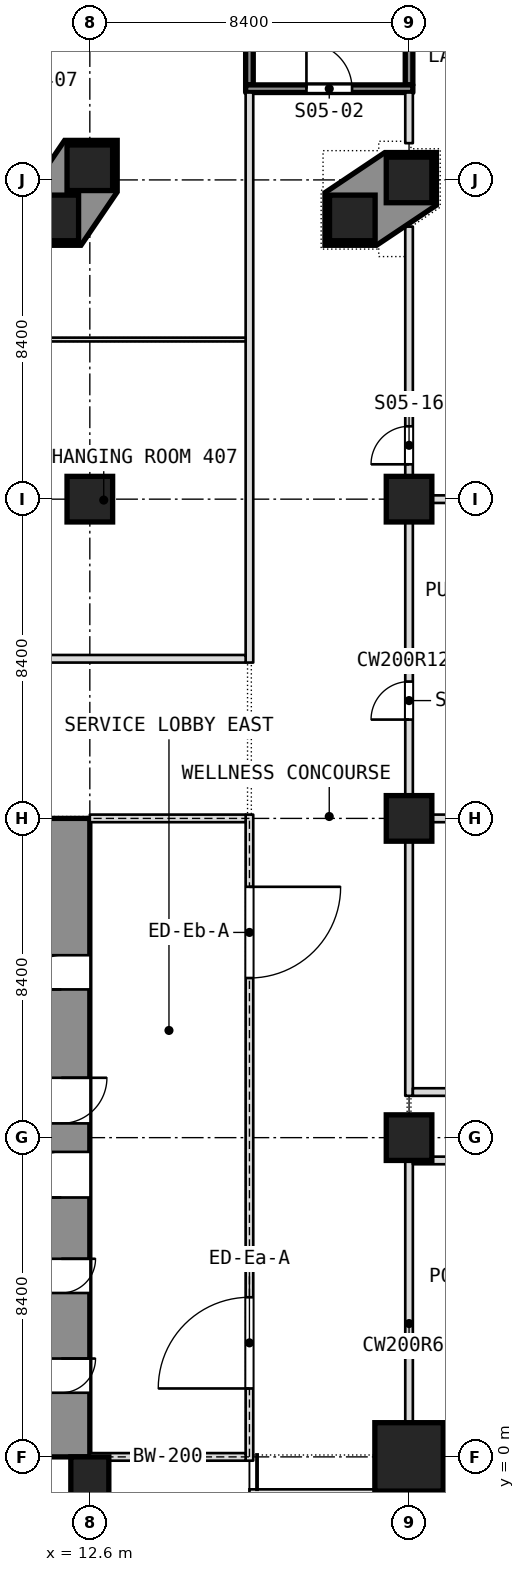
"""IFC4 building model, lengths in metres.
Left out: names, types, materials, properties, quantities, classifications, styles, units other than length and angle.
Written with IfcOpenShell. Run it as: python <this file> out.ifc"""

import sys

from ifc_helpers import new_model, si_unit, direction, frame, frame_2d, origin, origin_2d, place, context, subcontext, project, spatial, polyline, rectangle, outline, extrude, element, fill, save


model = new_model("IFC4")
c1 = context("Model", 3, precision=1e-05, world=origin(), true_north=direction((0.0, 1.0)))
c2 = subcontext(c1, "Body", "Model", "MODEL_VIEW")
j1 = project(units=[si_unit("LENGTHUNIT", "METRE"), si_unit("PLANEANGLEUNIT", "RADIAN")], contexts=[c1])
p1 = place(None, origin())
s1 = spatial("IfcSite", under=j1, at=p1, CompositionType="ELEMENT")
p2 = place(p1, origin())
s2 = spatial("IfcBuilding", under=s1, at=p2, CompositionType="ELEMENT")
p3 = place(p2, frame((0.0, 0.0, 26.0)))
s3 = spatial("IfcBuildingStorey", under=s2, at=p3, CompositionType="ELEMENT", Elevation=26.0)
p4 = place(p3, frame((21.0, 0.0, 0.0), z_axis=(0.0, 0.0, 1.0), x_axis=(1.0, 0.0, 0.0)))
e1 = element("IfcColumn", 1, at=p4, inside=s3, PredefinedType="COLUMN", context=c2, shape_type="SweptSolid", body=[
    extrude(rectangle(XDim=1.8, YDim=1.8, at=origin_2d()), origin(), (0.0, 0.0, 1.0), 5.0),
])
for number, where, z_axis, x_axis in (
    (2, (21.0, 8.4, 0.0), (0.0, 0.0, 1.0), (1.0, 0.0, 0.0)),
    (3, (21.0, 16.8, 0.0), (0.0, 0.0, 1.0), (1.0, 0.0, 0.0)),
    (4, (12.6, 25.2, 0.0), (0.0, 0.0, 1.0), (1.0, 0.0, 0.0)),
    (5, (21.0, 25.2, 0.0), (0.0, 0.0, 1.0), (1.0, 0.0, 0.0)),
    (6, (12.6, 33.92, 0.0), (0.0, 0.0, 1.0), (1.0, 0.0, 0.0)),
    (7, (21.0, 33.6, 0.0), (0.0, 0.0, 1.0), (1.0, 0.0, 0.0)),
):
    element("IfcColumn", number, at=place(p3, frame(where, z_axis=z_axis, x_axis=x_axis)), inside=s3, PredefinedType="COLUMN", context=c2, shape_type="SweptSolid", body=[
        extrude(rectangle(XDim=1.2, YDim=1.2, at=origin_2d()), origin(), (0.0, 0.0, 1.0), 5.0),
    ])
p5 = place(p3, frame((11.85, 0.0, 0.0), z_axis=(0.0, 0.0, 1.0), x_axis=(0.0, 1.0, 0.0)))
e8 = element("IfcWall", 8, at=p5, inside=s3, PredefinedType="SHEAR", context=c2, shape_type="SweptSolid", body=[
    extrude(rectangle(XDim=16.8, YDim=1.5, at=frame_2d((8.4, 0.0))), origin(), (0.0, 0.0, 1.0), 5.0),
])
p6 = place(p5, frame((1.688, 0.0, 0.0)))
e9 = element("IfcOpeningElement", 9, at=p6, cuts=e8, PredefinedType="OPENING", context=c2, shape_type="SweptSolid", body=[
    extrude(rectangle(XDim=0.9, YDim=2.1, at=frame_2d((0.45, 1.05))), frame((0.0, 0.75, 0.0), z_axis=(0.0, -1.0, 0.0), x_axis=(1.0, 0.0, 0.0)), (0.0, 0.0, 1.0), 1.5),
])
p7 = place(p5, frame((4.312, 0.0, 0.0)))
e10 = element("IfcOpeningElement", 10, at=p7, cuts=e8, PredefinedType="OPENING", context=c2, shape_type="SweptSolid", body=[
    extrude(rectangle(XDim=0.9, YDim=2.1, at=frame_2d((0.45, 1.05))), frame((0.0, 0.75, 0.0), z_axis=(0.0, -1.0, 0.0), x_axis=(1.0, 0.0, 0.0)), (0.0, 0.0, 1.0), 1.5),
])
p8 = place(p5, frame((6.825, 0.0, 0.0)))
e11 = element("IfcOpeningElement", 11, at=p8, cuts=e8, PredefinedType="OPENING", context=c2, shape_type="SweptSolid", body=[
    extrude(rectangle(XDim=1.2, YDim=2.1, at=frame_2d((0.6, 1.05))), frame((0.0, 0.75, 0.0), z_axis=(0.0, -1.0, 0.0), x_axis=(1.0, 0.0, 0.0)), (0.0, 0.0, 1.0), 1.5),
])
p9 = place(p5, frame((12.3, 0.0, 0.0)))
e12 = element("IfcOpeningElement", 12, at=p9, cuts=e8, PredefinedType="OPENING", context=c2, shape_type="SweptSolid", body=[
    extrude(rectangle(XDim=0.9, YDim=2.1, at=frame_2d((0.45, 1.05))), frame((0.0, 0.75, 0.0), z_axis=(0.0, -1.0, 0.0), x_axis=(1.0, 0.0, 0.0)), (0.0, 0.0, 1.0), 1.5),
])
p10 = place(p5, frame((8.775, 0.0, 0.0)))
e13 = element("IfcOpeningElement", 13, at=p10, cuts=e8, PredefinedType="OPENING", context=c2, shape_type="SweptSolid", body=[
    extrude(rectangle(XDim=1.2, YDim=2.1, at=frame_2d((0.6, 1.05))), frame((0.0, 0.75, 0.0), z_axis=(0.0, -1.0, 0.0), x_axis=(1.0, 0.0, 0.0)), (0.0, 0.0, 1.0), 1.5),
])
for number, where, z_axis, x_axis in (
    (14, (11.704, 32.6, 0.0), (0.0, 0.0, 1.0), (1.0, 0.0, 0.0)),
    (15, (19.507, 32.6, 0.0), (0.0, 0.0, 1.0), (1.0, 0.0, 0.0)),
):
    element("IfcColumn", number, at=place(p3, frame(where, z_axis=z_axis, x_axis=x_axis)), inside=s3, PredefinedType="COLUMN", context=c2, shape_type="SweptSolid", body=[
        extrude(rectangle(XDim=1.2, YDim=1.2, at=origin_2d()), origin(), (0.0, 0.0, 1.0), 5.0),
    ])
p11 = place(p3, frame((12.6, -0.5, 0.0), z_axis=(0.0, 0.0, 1.0), x_axis=(1.0, 0.0, 0.0)))
e16 = element("IfcColumn", 16, at=p11, inside=s3, PredefinedType="COLUMN", context=c2, shape_type="SweptSolid", body=[
    extrude(rectangle(XDim=1.0, YDim=1.0, at=origin_2d()), origin(), (0.0, 0.0, 1.0), 5.0),
])
p12 = place(p3, frame((21.0, -0.884, 0.0), z_axis=(0.0, 0.0, 1.0), x_axis=(0.0, 1.0, 0.0)))
e17 = element("IfcWall", 17, at=p12, inside=s3, PredefinedType="PARTITIONING", context=c2, shape_type="SweptSolid", body=[
    extrude(rectangle(XDim=8.784, YDim=0.2, at=frame_2d((4.392, 0.0))), origin(), (0.0, 0.0, 1.0), 4.68),
])
p13 = place(p3, frame((21.0, 9.5, 0.0), z_axis=(0.0, 0.0, 1.0), x_axis=(0.0, 1.0, 0.0)))
e18 = element("IfcWall", 18, at=p13, inside=s3, PredefinedType="PARTITIONING", context=c2, shape_type="SweptSolid", body=[
    extrude(rectangle(XDim=22.871, YDim=0.2, at=frame_2d((11.436, 0.0))), origin(), (0.0, 0.0, 1.0), 4.68),
])
p14 = place(p13, frame((9.9, 0.0, 0.0)))
e19 = element("IfcOpeningElement", 19, at=p14, cuts=e18, PredefinedType="OPENING", context=c2, shape_type="SweptSolid", body=[
    extrude(rectangle(XDim=1.0, YDim=2.1, at=frame_2d((0.5, 1.05))), frame((0.0, 0.1, 0.0), z_axis=(0.0, -1.0, 0.0), x_axis=(1.0, 0.0, 0.0)), (0.0, 0.0, 1.0), 0.2),
])
p15 = place(p13, frame((16.617, 0.0, 0.0)))
e20 = element("IfcOpeningElement", 20, at=p15, cuts=e18, PredefinedType="OPENING", context=c2, shape_type="SweptSolid", body=[
    extrude(rectangle(XDim=1.0, YDim=2.1, at=frame_2d((0.5, 1.05))), frame((0.0, 0.1, 0.0), z_axis=(0.0, -1.0, 0.0), x_axis=(1.0, 0.0, 0.0)), (0.0, 0.0, 1.0), 0.2),
])
p16 = place(p3, frame((21.0, 34.567, 0.0), z_axis=(0.0, 0.0, 1.0), x_axis=(0.0, 1.0, 0.0)))
e21 = element("IfcWall", 21, at=p16, inside=s3, PredefinedType="PARTITIONING", context=c2, shape_type="SweptSolid", body=[
    extrude(rectangle(XDim=1.333, YDim=0.2, at=frame_2d((0.667, 0.0))), origin(), (0.0, 0.0, 1.0), 4.68),
])
p17 = place(p3, frame((21.0, 36.1, 0.0), z_axis=(0.0, 0.0, 1.0), x_axis=(0.0, 1.0, 0.0)))
e22 = element("IfcWall", 22, at=p17, inside=s3, PredefinedType="PARTITIONING", context=c2, shape_type="SweptSolid", body=[
    extrude(rectangle(XDim=6.484, YDim=0.2, at=frame_2d((3.242, 0.0))), origin(), (0.0, 0.0, 1.0), 4.68),
])
p18 = place(p3, frame((16.8, 20.9, 0.0), z_axis=(0.0, 0.0, 1.0), x_axis=(0.0, 1.0, 0.0)))
e23 = element("IfcWall", 23, at=p18, inside=s3, PredefinedType="PARTITIONING", context=c2, shape_type="SweptSolid", body=[
    extrude(rectangle(XDim=15.0, YDim=0.2, at=frame_2d((7.5, 0.0))), origin(), (0.0, 0.0, 1.0), 4.68),
])
p19 = place(p3, frame((16.8, 36.1, 0.0), z_axis=(0.0, 0.0, 1.0), x_axis=(0.0, 1.0, 0.0)))
e24 = element("IfcWall", 24, at=p19, inside=s3, PredefinedType="PARTITIONING", context=c2, shape_type="SweptSolid", body=[
    extrude(rectangle(XDim=6.484, YDim=0.2, at=frame_2d((3.242, 0.0))), origin(), (0.0, 0.0, 1.0), 4.68),
])
p20 = place(p3, frame((21.1, 7.8, 0.0), z_axis=(0.0, 0.0, 1.0), x_axis=(1.0, 0.0, 0.0)))
e25 = element("IfcWall", 25, at=p20, inside=s3, PredefinedType="PARTITIONING", context=c2, shape_type="SweptSolid", body=[
    extrude(rectangle(XDim=17.284, YDim=0.2, at=frame_2d((8.642, 0.0))), origin(), (0.0, 0.0, 1.0), 4.68),
])
p21 = place(p20, frame((4.175, 0.0, 0.0)))
e26 = element("IfcOpeningElement", 26, at=p21, cuts=e25, PredefinedType="OPENING", context=c2, shape_type="SweptSolid", body=[
    extrude(rectangle(XDim=1.8, YDim=2.1, at=frame_2d((0.9, 1.05))), frame((0.0, 0.1, 0.0), z_axis=(0.0, -1.0, 0.0), x_axis=(1.0, 0.0, 0.0)), (0.0, 0.0, 1.0), 0.2),
])
p22 = place(p3, frame((21.1, 9.6, 0.0), z_axis=(0.0, 0.0, 1.0), x_axis=(1.0, 0.0, 0.0)))
e27 = element("IfcWall", 27, at=p22, inside=s3, PredefinedType="PARTITIONING", context=c2, shape_type="SweptSolid", body=[
    extrude(rectangle(XDim=6.3, YDim=0.2, at=frame_2d((3.15, 0.0))), origin(), (0.0, 0.0, 1.0), 4.68),
])
p23 = place(p22, frame((2.25, 0.0, 0.0)))
e28 = element("IfcOpeningElement", 28, at=p23, cuts=e27, PredefinedType="OPENING", context=c2, shape_type="SweptSolid", body=[
    extrude(rectangle(XDim=1.8, YDim=2.1, at=frame_2d((0.9, 1.05))), frame((0.0, 0.1, 0.0), z_axis=(0.0, -1.0, 0.0), x_axis=(1.0, 0.0, 0.0)), (0.0, 0.0, 1.0), 0.2),
])
p24 = place(p3, frame((21.1, 16.8, 0.0), z_axis=(0.0, 0.0, 1.0), x_axis=(1.0, 0.0, 0.0)))
e29 = element("IfcWall", 29, at=p24, inside=s3, PredefinedType="PARTITIONING", context=c2, shape_type="SweptSolid", body=[
    extrude(rectangle(XDim=6.53, YDim=0.2, at=frame_2d((3.265, 0.0))), origin(), (0.0, 0.0, 1.0), 4.68),
])
p25 = place(p3, frame((-16.7, 21.0, 0.0), z_axis=(0.0, 0.0, 1.0), x_axis=(1.0, 0.0, 0.0)))
e30 = element("IfcWall", 30, at=p25, inside=s3, PredefinedType="PARTITIONING", context=c2, shape_type="SweptSolid", body=[
    extrude(rectangle(XDim=33.4, YDim=0.2, at=frame_2d((16.7, 0.0))), origin(), (0.0, 0.0, 1.0), 4.68),
])
p26 = place(p25, frame((15.8, 0.0, 0.0)))
e31 = element("IfcOpeningElement", 31, at=p26, cuts=e30, PredefinedType="OPENING", context=c2, shape_type="SweptSolid", body=[
    extrude(rectangle(XDim=1.8, YDim=2.1, at=frame_2d((0.9, 1.05))), frame((0.0, 0.1, 0.0), z_axis=(0.0, -1.0, 0.0), x_axis=(1.0, 0.0, 0.0)), (0.0, 0.0, 1.0), 0.2),
])
p27 = place(p25, frame((26.6, 0.0, 0.0)))
e32 = element("IfcOpeningElement", 32, at=p27, cuts=e30, PredefinedType="OPENING", context=c2, shape_type="SweptSolid", body=[
    extrude(rectangle(XDim=1.0, YDim=2.1, at=frame_2d((0.5, 1.05))), frame((0.0, 0.1, 0.0), z_axis=(0.0, -1.0, 0.0), x_axis=(1.0, 0.0, 0.0)), (0.0, 0.0, 1.0), 0.2),
])
p28 = place(p3, frame((21.1, 25.2, 0.0), z_axis=(0.0, 0.0, 1.0), x_axis=(1.0, 0.0, 0.0)))
e33 = element("IfcWall", 33, at=p28, inside=s3, PredefinedType="PARTITIONING", context=c2, shape_type="SweptSolid", body=[
    extrude(rectangle(XDim=6.765, YDim=0.2, at=frame_2d((3.382, 0.0))), origin(), (0.0, 0.0, 1.0), 4.68),
])
p29 = place(p3, frame((4.3, 29.4, 0.0), z_axis=(0.0, 0.0, 1.0), x_axis=(1.0, 0.0, 0.0)))
e34 = element("IfcWall", 34, at=p29, inside=s3, PredefinedType="PARTITIONING", context=c2, shape_type="SweptSolid", body=[
    extrude(rectangle(XDim=12.4, YDim=0.1, at=frame_2d((6.2, 0.0))), origin(), (0.0, 0.0, 1.0), 4.68),
])
p30 = place(p29, frame((5.7, 0.0, 0.0)))
e35 = element("IfcOpeningElement", 35, at=p30, cuts=e34, PredefinedType="OPENING", context=c2, shape_type="SweptSolid", body=[
    extrude(rectangle(XDim=1.0, YDim=2.1, at=frame_2d((0.5, 1.05))), frame((0.0, 0.05, 0.0), z_axis=(0.0, -1.0, 0.0), x_axis=(1.0, 0.0, 0.0)), (0.0, 0.0, 1.0), 0.1),
])
p31 = place(p3, frame((16.7, 36.0, 0.0), z_axis=(0.0, 0.0, 1.0), x_axis=(1.0, 0.0, 0.0)))
e36 = element("IfcWall", 36, at=p31, inside=s3, PredefinedType="PARTITIONING", context=c2, shape_type="SweptSolid", body=[
    extrude(rectangle(XDim=4.4, YDim=0.2, at=frame_2d((2.2, 0.0))), origin(), (0.0, 0.0, 1.0), 4.68),
])
p32 = place(p31, frame((1.6, 0.0, 0.0)))
e37 = element("IfcOpeningElement", 37, at=p32, cuts=e36, PredefinedType="OPENING", context=c2, shape_type="SweptSolid", body=[
    extrude(rectangle(XDim=1.2, YDim=2.1, at=frame_2d((0.6, 1.05))), frame((0.0, 0.1, 0.0), z_axis=(0.0, -1.0, 0.0), x_axis=(1.0, 0.0, 0.0)), (0.0, 0.0, 1.0), 0.2),
])
p33 = place(p3, frame((16.8, -0.1, 0.0), z_axis=(0.0, 0.0, 1.0), x_axis=(0.0, 1.0, 0.0)))
e38 = element("IfcWall", 38, at=p33, inside=s3, PredefinedType="PARTITIONING", context=c2, shape_type="SweptSolid", body=[
    extrude(rectangle(XDim=17.0, YDim=0.2, at=frame_2d((8.5, 0.0))), origin(), (0.0, 0.0, 1.0), 4.8),
])
p34 = place(p33, frame((1.9, 0.0, 0.0)))
e39 = element("IfcOpeningElement", 39, at=p34, cuts=e38, PredefinedType="OPENING", context=c2, shape_type="SweptSolid", body=[
    extrude(rectangle(XDim=2.4, YDim=2.1, at=frame_2d((1.2, 1.05))), frame((0.0, 0.1, 0.0), z_axis=(0.0, -1.0, 0.0), x_axis=(1.0, 0.0, 0.0)), (0.0, 0.0, 1.0), 0.2),
])
p35 = place(p33, frame((12.7, 0.0, 0.0)))
e40 = element("IfcOpeningElement", 40, at=p35, cuts=e38, PredefinedType="OPENING", context=c2, shape_type="SweptSolid", body=[
    extrude(rectangle(XDim=2.4, YDim=2.1, at=frame_2d((1.2, 1.05))), frame((0.0, 0.1, 0.0), z_axis=(0.0, -1.0, 0.0), x_axis=(1.0, 0.0, 0.0)), (0.0, 0.0, 1.0), 0.2),
])
for number, where, z_axis, x_axis in (
    (41, (12.6, 0.0, 0.0), (0.0, 0.0, 1.0), (1.0, 0.0, 0.0)),
    (42, (12.6, 16.8, 0.0), (0.0, 0.0, 1.0), (1.0, 0.0, 0.0)),
):
    element("IfcWall", number, at=place(p3, frame(where, z_axis=z_axis, x_axis=x_axis)), inside=s3, PredefinedType="PARTITIONING", context=c2, shape_type="SweptSolid", body=[
        extrude(rectangle(XDim=4.1, YDim=0.2, at=frame_2d((2.05, 0.0))), origin(), (0.0, 0.0, 1.0), 4.8),
    ])
p36 = place(p3, origin())
e43 = element("IfcWall", 43, at=p36, inside=s3, PredefinedType="SOLIDWALL", context=c2, shape_type="SweptSolid", body=[
    extrude(outline(polyline([(11.937, 34.64), (13.32, 34.64), (13.32, 33.283), (12.368, 31.88), (10.984, 31.88), (10.984, 33.237), (11.937, 34.64)]), holes=[polyline([(13.2, 33.32), (13.2, 34.52), (12.0, 34.52), (12.0, 33.32), (13.2, 33.32)]), polyline([(12.304, 32.0), (12.304, 33.2), (11.104, 33.2), (11.104, 32.0), (12.304, 32.0)])]), origin(), (0.0, 0.0, 1.0), 5.0),
])
p37 = place(p3, origin())
e44 = element("IfcWall", 44, at=p37, inside=s3, PredefinedType="SOLIDWALL", context=c2, shape_type="SweptSolid", body=[
    extrude(outline(polyline([(20.364, 34.32), (21.72, 34.32), (21.72, 32.936), (20.143, 31.88), (18.787, 31.88), (18.787, 33.264), (20.364, 34.32)]), holes=[polyline([(21.6, 33.0), (21.6, 34.2), (20.4, 34.2), (20.4, 33.0), (21.6, 33.0)]), polyline([(20.107, 32.0), (20.107, 33.2), (18.907, 33.2), (18.907, 32.0), (20.107, 32.0)])]), origin(), (0.0, 0.0, 1.0), 5.0),
])
p38 = place(p32, origin())
e45 = element("IfcDoor", 45, at=p38, inside=s3, OperationType="SINGLE_SWING_LEFT", PredefinedType="DOOR", context=c2, shape_type="SweptSolid", body=[
    extrude(rectangle(XDim=1.2, YDim=2.1, at=frame_2d((0.6, 1.05))), frame((0.0, 0.025, 0.0), z_axis=(0.0, -1.0, 0.0), x_axis=(1.0, 0.0, 0.0)), (0.0, 0.0, 1.0), 0.05),
])
fill(e37, e45)
p39 = place(p14, origin())
e46 = element("IfcDoor", 46, at=p39, inside=s3, OperationType="SINGLE_SWING_RIGHT", PredefinedType="DOOR", context=c2, shape_type="SweptSolid", body=[
    extrude(rectangle(XDim=1.0, YDim=2.1, at=frame_2d((0.5, 1.05))), frame((0.0, 0.025, 0.0), z_axis=(0.0, -1.0, 0.0), x_axis=(1.0, 0.0, 0.0)), (0.0, 0.0, 1.0), 0.05),
])
fill(e19, e46)
p40 = place(p15, origin())
e47 = element("IfcDoor", 47, at=p40, inside=s3, OperationType="SINGLE_SWING_RIGHT", PredefinedType="DOOR", context=c2, shape_type="SweptSolid", body=[
    extrude(rectangle(XDim=1.0, YDim=2.1, at=frame_2d((0.5, 1.05))), frame((0.0, 0.025, 0.0), z_axis=(0.0, -1.0, 0.0), x_axis=(1.0, 0.0, 0.0)), (0.0, 0.0, 1.0), 0.05),
])
fill(e20, e47)
p41 = place(p6, origin())
e48 = element("IfcDoor", 48, at=p41, inside=s3, OperationType="SINGLE_SWING_LEFT", PredefinedType="DOOR", context=c2, shape_type="SweptSolid", body=[
    extrude(rectangle(XDim=0.9, YDim=2.1, at=frame_2d((0.45, 1.05))), frame((0.0, 0.025, 0.0), z_axis=(0.0, -1.0, 0.0), x_axis=(1.0, 0.0, 0.0)), (0.0, 0.0, 1.0), 0.05),
])
fill(e9, e48)
p42 = place(p7, origin())
e49 = element("IfcDoor", 49, at=p42, inside=s3, OperationType="SINGLE_SWING_LEFT", PredefinedType="DOOR", context=c2, shape_type="SweptSolid", body=[
    extrude(rectangle(XDim=0.9, YDim=2.1, at=frame_2d((0.45, 1.05))), frame((0.0, 0.025, 0.0), z_axis=(0.0, -1.0, 0.0), x_axis=(1.0, 0.0, 0.0)), (0.0, 0.0, 1.0), 0.05),
])
fill(e10, e49)
p43 = place(p8, origin())
e50 = element("IfcDoor", 50, at=p43, inside=s3, OperationType="SINGLE_SWING_LEFT", PredefinedType="DOOR", context=c2, shape_type="SweptSolid", body=[
    extrude(rectangle(XDim=1.2, YDim=2.1, at=frame_2d((0.6, 1.05))), frame((0.0, 0.025, 0.0), z_axis=(0.0, -1.0, 0.0), x_axis=(1.0, 0.0, 0.0)), (0.0, 0.0, 1.0), 0.05),
])
fill(e11, e50)
p44 = place(p9, origin())
e51 = element("IfcDoor", 51, at=p44, inside=s3, OperationType="SINGLE_SWING_LEFT", PredefinedType="DOOR", context=c2, shape_type="SweptSolid", body=[
    extrude(rectangle(XDim=0.9, YDim=2.1, at=frame_2d((0.45, 1.05))), frame((0.0, 0.025, 0.0), z_axis=(0.0, -1.0, 0.0), x_axis=(1.0, 0.0, 0.0)), (0.0, 0.0, 1.0), 0.05),
])
fill(e12, e51)
p45 = place(p10, origin())
e52 = element("IfcDoor", 52, at=p45, inside=s3, OperationType="SINGLE_SWING_LEFT", PredefinedType="DOOR", context=c2, shape_type="SweptSolid", body=[
    extrude(rectangle(XDim=1.2, YDim=2.1, at=frame_2d((0.6, 1.05))), frame((0.0, 0.025, 0.0), z_axis=(0.0, -1.0, 0.0), x_axis=(1.0, 0.0, 0.0)), (0.0, 0.0, 1.0), 0.05),
])
fill(e13, e52)
p46 = place(p34, origin())
e53 = element("IfcDoor", 53, at=p46, inside=s3, OperationType="DOUBLE_DOOR_SINGLE_SWING", PredefinedType="DOOR", context=c2, shape_type="SweptSolid", body=[
    extrude(rectangle(XDim=2.4, YDim=2.1, at=frame_2d((1.2, 1.05))), frame((0.0, 0.025, 0.0), z_axis=(0.0, -1.0, 0.0), x_axis=(1.0, 0.0, 0.0)), (0.0, 0.0, 1.0), 0.05),
])
fill(e39, e53)
p47 = place(p35, origin())
e54 = element("IfcDoor", 54, at=p47, inside=s3, OperationType="DOUBLE_DOOR_SINGLE_SWING", PredefinedType="DOOR", context=c2, shape_type="SweptSolid", body=[
    extrude(rectangle(XDim=2.4, YDim=2.1, at=frame_2d((1.2, 1.05))), frame((0.0, 0.025, 0.0), z_axis=(0.0, -1.0, 0.0), x_axis=(1.0, 0.0, 0.0)), (0.0, 0.0, 1.0), 0.05),
])
fill(e40, e54)
save(model, sys.argv[1])
